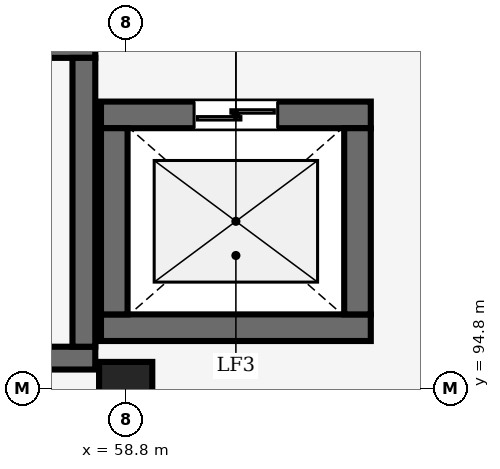
"""IFC4 building model, lengths in metres.
Left out: names, types, materials, properties, quantities, classifications, styles, units other than length and angle.
Written with IfcOpenShell. Run it as: python <this file> out.ifc"""

import sys

from ifc_helpers import new_model, si_unit, direction, frame, frame_2d, origin, origin_2d, place, context, subcontext, project, spatial, rectangle, extrude, element, fill, save


model = new_model("IFC4")
c1 = context("Model", 3, precision=1e-05, world=origin(), true_north=direction((0.0, 1.0)))
c2 = subcontext(c1, "Body", "Model", "MODEL_VIEW")
j1 = project(units=[si_unit("LENGTHUNIT", "METRE"), si_unit("PLANEANGLEUNIT", "RADIAN")], contexts=[c1])
p1 = place(None, origin())
s1 = spatial("IfcSite", under=j1, at=p1, CompositionType="ELEMENT")
p2 = place(p1, origin())
s2 = spatial("IfcBuilding", under=s1, at=p2, CompositionType="ELEMENT")
p3 = place(p2, origin())
s3 = spatial("IfcBuildingStorey", under=s2, at=p3, CompositionType="ELEMENT", Elevation=0.0)
p4 = place(p3, frame((58.8, 94.8, 0.0), z_axis=(0.0, 0.0, 1.0), x_axis=(1.0, 0.0, 0.0)))
e1 = element("IfcColumn", 1, at=p4, inside=s3, PredefinedType="COLUMN", context=c2, shape_type="SweptSolid", body=[
    extrude(rectangle(XDim=0.7, YDim=0.7, at=origin_2d()), origin(), (0.0, 0.0, 1.0), 4.8),
])
p5 = place(p3, frame((50.8, 95.2, 0.0), z_axis=(0.0, 0.0, 1.0), x_axis=(1.0, 0.0, 0.0)))
e2 = element("IfcWall", 2, at=p5, inside=s3, PredefinedType="SHEAR", context=c2, shape_type="SweptSolid", body=[
    extrude(rectangle(XDim=7.6, YDim=0.3, at=frame_2d((3.8, 0.0))), origin(), (0.0, 0.0, 1.0), 4.625),
])
p6 = place(p3, frame((50.8, 99.3, 0.0), z_axis=(0.0, 0.0, 1.0), x_axis=(1.0, 0.0, 0.0)))
e3 = element("IfcWall", 3, at=p6, inside=s3, PredefinedType="SHEAR", context=c2, shape_type="SweptSolid", body=[
    extrude(rectangle(XDim=7.6, YDim=0.3, at=frame_2d((3.8, 0.0))), origin(), (0.0, 0.0, 1.0), 4.625),
])
p7 = place(p6, frame((1.2, 0.0, 0.0)))
e4 = element("IfcOpeningElement", 4, at=p7, cuts=e3, PredefinedType="OPENING", context=c2, shape_type="SweptSolid", body=[
    extrude(rectangle(XDim=1.6, YDim=2.2, at=frame_2d((0.8, 1.1))), frame((0.0, 0.16, 0.0), z_axis=(0.0, -1.0, 0.0), x_axis=(1.0, 0.0, 0.0)), (0.0, 0.0, 1.0), 0.32),
])
p8 = place(p3, frame((58.25, 95.35, 0.0), z_axis=(0.0, 0.0, 1.0), x_axis=(0.0, 1.0, 0.0)))
e5 = element("IfcWall", 5, at=p8, inside=s3, PredefinedType="SHEAR", context=c2, shape_type="SweptSolid", body=[
    extrude(rectangle(XDim=3.8, YDim=0.3, at=frame_2d((1.9, 0.0))), origin(), (0.0, 0.0, 1.0), 4.625),
])
p9 = place(p3, frame((58.475, 95.6, 0.0), z_axis=(0.0, 0.0, 1.0), x_axis=(1.0, 0.0, 0.0)))
e6 = element("IfcWall", 6, at=p9, inside=s3, PredefinedType="SHEAR", context=c2, shape_type="SweptSolid", body=[
    extrude(rectangle(XDim=3.55, YDim=0.35, at=frame_2d((1.775, 0.0))), origin(), (0.0, 0.0, 1.0), 4.52),
])
p10 = place(p3, frame((58.475, 98.4, 0.0), z_axis=(0.0, 0.0, 1.0), x_axis=(1.0, 0.0, 0.0)))
e7 = element("IfcWall", 7, at=p10, inside=s3, PredefinedType="SHEAR", context=c2, shape_type="SweptSolid", body=[
    extrude(rectangle(XDim=3.55, YDim=0.35, at=frame_2d((1.775, 0.0))), origin(), (0.0, 0.0, 1.0), 4.52),
])
p11 = place(p10, frame((1.225, 0.0, 0.0)))
e8 = element("IfcOpeningElement", 8, at=p11, cuts=e7, PredefinedType="OPENING", context=c2, shape_type="SweptSolid", body=[
    extrude(rectangle(XDim=1.1, YDim=2.2, at=frame_2d((0.55, 1.1))), frame((0.0, 0.185, 0.0), z_axis=(0.0, -1.0, 0.0), x_axis=(1.0, 0.0, 0.0)), (0.0, 0.0, 1.0), 0.37),
])
for number, where, z_axis, x_axis in (
    (9, (58.65, 95.775, 0.0), (0.0, 0.0, 1.0), (0.0, 1.0, 0.0)),
    (10, (61.85, 95.775, 0.0), (0.0, 0.0, 1.0), (0.0, 1.0, 0.0)),
):
    element("IfcWall", number, at=place(p3, frame(where, z_axis=z_axis, x_axis=x_axis)), inside=s3, PredefinedType="SHEAR", context=c2, shape_type="SweptSolid", body=[
        extrude(rectangle(XDim=2.45, YDim=0.35, at=frame_2d((1.225, 0.0))), origin(), (0.0, 0.0, 1.0), 4.52),
    ])
p12 = place(p11, origin())
e11 = element("IfcDoor", 11, at=p12, inside=s3, OperationType="DOUBLE_DOOR_SLIDING", PredefinedType="DOOR", context=c2, shape_type="SweptSolid", body=[
    extrude(rectangle(XDim=1.1, YDim=2.2, at=frame_2d((0.55, 1.1))), frame((0.0, 0.025, 0.0), z_axis=(0.0, -1.0, 0.0), x_axis=(1.0, 0.0, 0.0)), (0.0, 0.0, 1.0), 0.05),
])
fill(e8, e11)
save(model, sys.argv[1])
